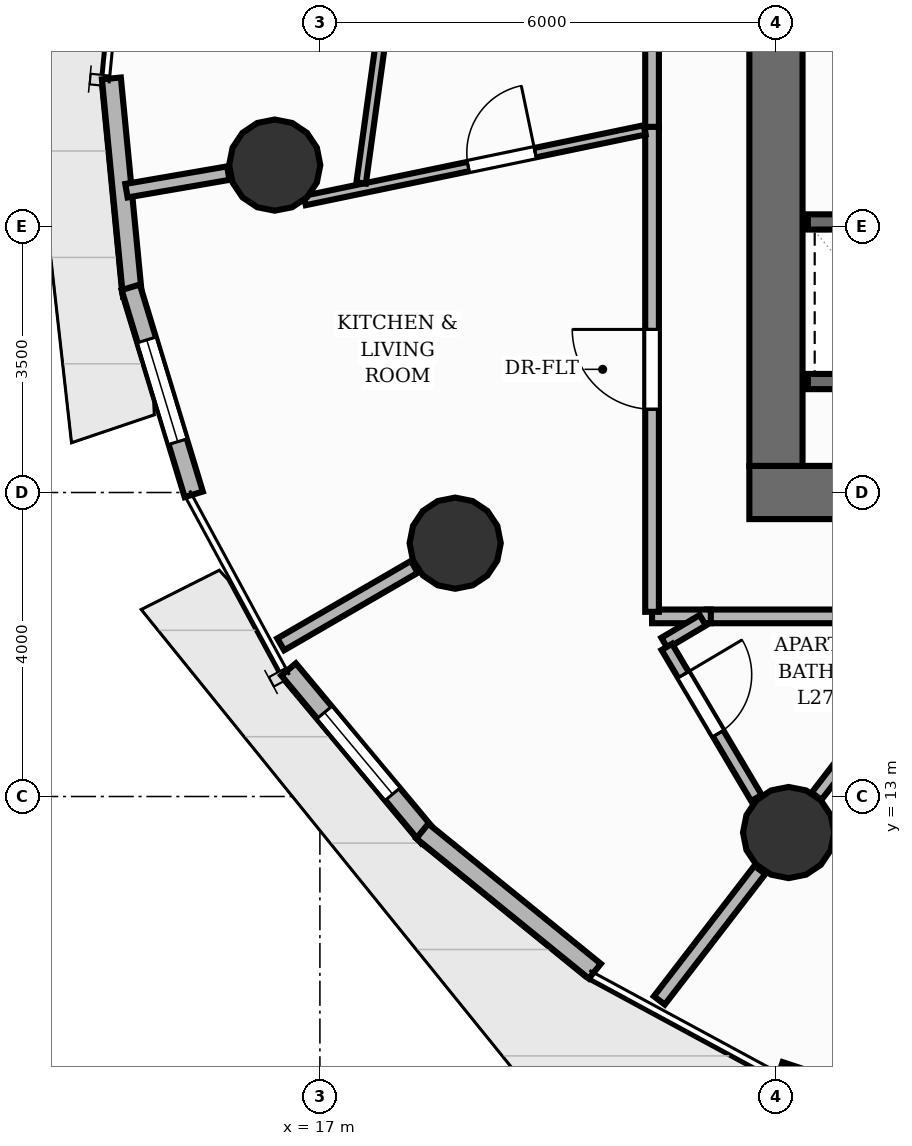
"""IFC4 building model, lengths in metres.
Left out: names, types, materials, properties, quantities, classifications, styles, units other than length and angle.
Written with IfcOpenShell. Run it as: python <this file> out.ifc"""

import sys

from ifc_helpers import new_model, si_unit, direction, frame, frame_2d, origin, origin_2d, place, context, subcontext, project, spatial, rectangle, circle, extrude, element, fill, save


model = new_model("IFC4")
c1 = context("Model", 3, precision=1e-05, world=origin(), true_north=direction((0.0, 1.0)))
c2 = subcontext(c1, "Body", "Model", "MODEL_VIEW")
j1 = project(units=[si_unit("LENGTHUNIT", "METRE"), si_unit("PLANEANGLEUNIT", "RADIAN")], contexts=[c1])
p1 = place(None, origin())
s1 = spatial("IfcSite", under=j1, at=p1, CompositionType="ELEMENT")
p2 = place(p1, origin())
s2 = spatial("IfcBuilding", under=s1, at=p2, CompositionType="ELEMENT")
p3 = place(p2, frame((0.0, 0.0, 93.28)))
s3 = spatial("IfcBuildingStorey", under=s2, at=p3, CompositionType="ELEMENT", Elevation=93.28)
p4 = place(p3, frame((22.65, 17.0, 0.0), z_axis=(0.0, 0.0, 1.0), x_axis=(1.0, 0.0, 0.0)))
e1 = element("IfcWall", 1, at=p4, inside=s3, PredefinedType="SHEAR", context=c2, shape_type="SweptSolid", body=[
    extrude(rectangle(XDim=18.7, YDim=0.7, at=frame_2d((9.35, 0.0))), origin(), (0.0, 0.0, 1.0), 3.2),
])
p5 = place(p4, frame((5.85, 0.0, 0.0)))
e2 = element("IfcOpeningElement", 2, at=p5, cuts=e1, PredefinedType="OPENING", context=c2, shape_type="SweptSolid", body=[
    extrude(rectangle(XDim=1.1, YDim=2.15, at=frame_2d((0.55, 1.075))), frame((0.0, 0.36, 0.0), z_axis=(0.0, -1.0, 0.0), x_axis=(1.0, 0.0, 0.0)), (0.0, 0.0, 1.0), 0.72),
])
p6 = place(p4, frame((9.4, 0.0, 0.0)))
e3 = element("IfcOpeningElement", 3, at=p6, cuts=e1, PredefinedType="OPENING", context=c2, shape_type="SweptSolid", body=[
    extrude(rectangle(XDim=0.9, YDim=2.1, at=frame_2d((0.45, 1.05))), frame((0.0, 0.36, 0.0), z_axis=(0.0, -1.0, 0.0), x_axis=(1.0, 0.0, 0.0)), (0.0, 0.0, 1.0), 0.72),
])
p7 = place(p3, frame((23.0, 17.35, 0.0), z_axis=(0.0, 0.0, 1.0), x_axis=(0.0, 1.0, 0.0)))
e4 = element("IfcWall", 4, at=p7, inside=s3, PredefinedType="SHEAR", context=c2, shape_type="SweptSolid", body=[
    extrude(rectangle(XDim=13.3, YDim=0.7, at=frame_2d((6.65, 0.0))), origin(), (0.0, 0.0, 1.0), 3.2),
])
for number, where, z_axis, x_axis in (
    (5, (16.406, 21.308, 0.0), (0.0, 0.0, 1.0), (1.0, 0.0, 0.0)),
    (6, (18.78, 16.333, 0.0), (0.0, 0.0, 1.0), (1.0, 0.0, 0.0)),
    (7, (23.167, 12.526, 0.0), (0.0, 0.0, 1.0), (1.0, 0.0, 0.0)),
):
    element("IfcColumn", number, at=place(p3, frame(where, z_axis=z_axis, x_axis=x_axis)), inside=s3, PredefinedType="COLUMN", context=c2, shape_type="SweptSolid", body=[
        extrude(circle(Radius=0.6, at=origin_2d()), origin(), (0.0, 0.0, 1.0), 3.2),
    ])
p8 = place(p3, frame((14.533, 19.588, 0.0), z_axis=(0.0, 0.0, 1.0), x_axis=(-0.096332339466, 0.995349225334, 0.0)))
e8 = element("IfcWall", 8, at=p8, inside=s3, PredefinedType="SOLIDWALL", context=c2, shape_type="SweptSolid", body=[
    extrude(rectangle(XDim=2.874, YDim=0.25, at=frame_2d((1.437, 0.0))), origin(), (0.0, 0.0, 1.0), 2.96),
])
p9 = place(p3, frame((15.34, 16.976, 0.0), z_axis=(0.0, 0.0, 1.0), x_axis=(-0.291144558409, 0.956679071637, 0.0)))
e9 = element("IfcWall", 9, at=p9, inside=s3, PredefinedType="SOLIDWALL", context=c2, shape_type="SweptSolid", body=[
    extrude(rectangle(XDim=2.848, YDim=0.25, at=frame_2d((1.424, 0.0))), origin(), (0.0, 0.0, 1.0), 2.96),
])
p10 = place(p9, frame((0.724, 0.0, 0.85)))
e10 = element("IfcOpeningElement", 10, at=p10, cuts=e9, PredefinedType="OPENING", context=c2, shape_type="SweptSolid", body=[
    extrude(rectangle(XDim=1.4, YDim=1.55, at=frame_2d((0.7, 0.775))), frame((0.0, 0.135, 0.0), z_axis=(0.0, -1.0, 0.0), x_axis=(1.0, 0.0, 0.0)), (0.0, 0.0, 1.0), 0.27),
])
p11 = place(p3, frame((18.428, 12.465, 0.0), z_axis=(0.0, 0.0, 1.0), x_axis=(-0.640518566271, 0.76794268423, 0.0)))
e11 = element("IfcWall", 11, at=p11, inside=s3, PredefinedType="SOLIDWALL", context=c2, shape_type="SweptSolid", body=[
    extrude(rectangle(XDim=2.874, YDim=0.25, at=frame_2d((1.437, 0.0))), origin(), (0.0, 0.0, 1.0), 2.96),
])
p12 = place(p11, frame((0.737, 0.0, 0.85)))
e12 = element("IfcOpeningElement", 12, at=p12, cuts=e11, PredefinedType="OPENING", context=c2, shape_type="SweptSolid", body=[
    extrude(rectangle(XDim=1.4, YDim=1.55, at=frame_2d((0.7, 0.775))), frame((0.0, 0.135, 0.0), z_axis=(0.0, -1.0, 0.0), x_axis=(1.0, 0.0, 0.0)), (0.0, 0.0, 1.0), 0.27),
])
p13 = place(p3, frame((20.617, 10.702, 0.0), z_axis=(0.0, 0.0, 1.0), x_axis=(-0.776285131062, 0.630381943976, 0.0)))
e13 = element("IfcWall", 13, at=p13, inside=s3, PredefinedType="SOLIDWALL", context=c2, shape_type="SweptSolid", body=[
    extrude(rectangle(XDim=2.923, YDim=0.25, at=frame_2d((1.462, 0.0))), origin(), (0.0, 0.0, 1.0), 2.96),
])
p14 = place(p3, frame((25.955, 8.426, 0.0), z_axis=(0.0, 0.0, 1.0), x_axis=(-0.949533409058, 0.313665913166, 0.0)))
e14 = element("IfcWall", 14, at=p14, inside=s3, PredefinedType="SOLIDWALL", context=c2, shape_type="SweptSolid", body=[
    extrude(rectangle(XDim=3.061, YDim=0.25, at=frame_2d((1.53, 0.0))), origin(), (0.0, 0.0, 1.0), 2.96),
])
for number, where, z_axis, x_axis in (
    (15, (23.42, 18.46, 0.0), (0.0, 0.0, 1.0), (1.0, 0.0, 0.0)),
    (16, (23.42, 20.56, 0.0), (0.0, 0.0, 1.0), (1.0, 0.0, 0.0)),
):
    element("IfcWall", number, at=place(p3, frame(where, z_axis=z_axis, x_axis=x_axis)), inside=s3, PredefinedType="SHEAR", context=c2, shape_type="SweptSolid", body=[
        extrude(rectangle(XDim=1.71, YDim=0.2, at=frame_2d((0.855, 0.0))), origin(), (0.0, 0.0, 1.0), 3.2),
    ])
p15 = place(p3, frame((15.794, 21.202, 0.0), z_axis=(0.0, 0.0, 1.0), x_axis=(-0.98540615772, -0.170219576807, 0.0)))
e17 = element("IfcWall", 17, at=p15, inside=s3, PredefinedType="PARTITIONING", context=c2, shape_type="SweptSolid", body=[
    extrude(rectangle(XDim=1.36, YDim=0.18, at=frame_2d((0.68, 0.0))), origin(), (0.0, 0.0, 1.0), 2.26),
])
p16 = place(p3, frame((18.243, 16.022, 0.0), z_axis=(0.0, 0.0, 1.0), x_axis=(-0.865025978628, -0.501727073516, 0.0)))
e18 = element("IfcWall", 18, at=p16, inside=s3, PredefinedType="PARTITIONING", context=c2, shape_type="SweptSolid", body=[
    extrude(rectangle(XDim=2.033, YDim=0.18, at=frame_2d((1.017, 0.0))), origin(), (0.0, 0.0, 1.0), 2.26),
])
p17 = place(p3, frame((22.788, 12.034, 0.0), z_axis=(0.0, 0.0, 1.0), x_axis=(-0.610026423006, -0.792381071981, 0.0)))
e19 = element("IfcWall", 19, at=p17, inside=s3, PredefinedType="PARTITIONING", context=c2, shape_type="SweptSolid", body=[
    extrude(rectangle(XDim=2.167, YDim=0.18, at=frame_2d((1.084, 0.0))), origin(), (0.0, 0.0, 1.0), 2.26),
])
p18 = place(p3, frame((38.645, 15.37, 0.0), z_axis=(0.0, 0.0, 1.0), x_axis=(-1.0, 0.0, 0.0)))
e20 = element("IfcWall", 20, at=p18, inside=s3, PredefinedType="PARTITIONING", context=c2, shape_type="SweptSolid", body=[
    extrude(rectangle(XDim=16.557, YDim=0.18, at=frame_2d((8.278, 0.0))), origin(), (0.0, 0.0, 1.0), 2.955),
])
p19 = place(p18, frame((6.513, 0.0, 0.0)))
e21 = element("IfcOpeningElement", 21, at=p19, cuts=e20, PredefinedType="OPENING", context=c2, shape_type="SweptSolid", body=[
    extrude(rectangle(XDim=1.05, YDim=2.15, at=frame_2d((0.525, 1.075))), frame((0.0, 0.1, 0.0), z_axis=(0.0, -1.0, 0.0), x_axis=(1.0, 0.0, 0.0)), (0.0, 0.0, 1.0), 0.2),
])
p20 = place(p3, frame((21.37, 21.771, 0.0), z_axis=(0.0, 0.0, 1.0), x_axis=(0.0, 1.0, 0.0)))
e22 = element("IfcWall", 22, at=p20, inside=s3, PredefinedType="PARTITIONING", context=c2, shape_type="SweptSolid", body=[
    extrude(rectangle(XDim=10.859, YDim=0.18, at=frame_2d((5.43, 0.0))), origin(), (0.0, 0.0, 1.0), 2.955),
])
p21 = place(p3, frame((22.144, 15.37, 0.0), z_axis=(0.0, 0.0, 1.0), x_axis=(-1.0, 0.0, 0.0)))
e23 = element("IfcWall", 23, at=p21, inside=s3, PredefinedType="PARTITIONING", context=c2, shape_type="SweptSolid", body=[
    extrude(rectangle(XDim=0.773, YDim=0.18, at=frame_2d((0.387, 0.0))), origin(), (0.0, 0.0, 1.0), 2.955),
])
p22 = place(p3, frame((21.37, 15.43, 0.0), z_axis=(0.0, 0.0, 1.0), x_axis=(0.0, 1.0, 0.0)))
e24 = element("IfcWall", 24, at=p22, inside=s3, PredefinedType="PARTITIONING", context=c2, shape_type="SweptSolid", body=[
    extrude(rectangle(XDim=6.381, YDim=0.18, at=frame_2d((3.19, 0.0))), origin(), (0.0, 0.0, 1.0), 2.955),
])
p23 = place(p22, frame((2.666, 0.0, 0.0)))
e25 = element("IfcOpeningElement", 25, at=p23, cuts=e24, PredefinedType="OPENING", context=c2, shape_type="SweptSolid", body=[
    extrude(rectangle(XDim=1.05, YDim=2.15, at=frame_2d((0.525, 1.075))), frame((0.0, 0.1, 0.0), z_axis=(0.0, -1.0, 0.0), x_axis=(1.0, 0.0, 0.0)), (0.0, 0.0, 1.0), 0.2),
])
p24 = place(p3, frame((23.534, 13.003, 0.0), z_axis=(0.0, 0.0, 1.0), x_axis=(0.610033601295, 0.792375545617, 0.0)))
e26 = element("IfcWall", 26, at=p24, inside=s3, PredefinedType="PLUMBINGWALL", context=c2, shape_type="SweptSolid", body=[
    extrude(rectangle(XDim=2.887, YDim=0.16, at=frame_2d((1.443, 0.0))), origin(), (0.0, 0.0, 1.0), 2.26),
])
p25 = place(p3, frame((22.038, 15.319, 0.0), z_axis=(0.0, 0.0, 1.0), x_axis=(-0.860054653874, -0.510201913315, 0.0)))
e27 = element("IfcWall", 27, at=p25, inside=s3, PredefinedType="PLUMBINGWALL", context=c2, shape_type="SweptSolid", body=[
    extrude(rectangle(XDim=0.586, YDim=0.16, at=frame_2d((0.293, 0.0))), origin(), (0.0, 0.0, 1.0), 2.955),
])
p26 = place(p3, frame((21.564, 14.969, 0.0), z_axis=(0.0, 0.0, 1.0), x_axis=(0.51007742589, -0.860128490168, 0.0)))
e28 = element("IfcWall", 28, at=p26, inside=s3, PredefinedType="PLUMBINGWALL", context=c2, shape_type="SweptSolid", body=[
    extrude(rectangle(XDim=2.311, YDim=0.16, at=frame_2d((1.156, 0.0))), origin(), (0.0, 0.0, 1.0), 2.403),
])
p27 = place(p26, frame((0.426, 0.0, 0.0)))
e29 = element("IfcOpeningElement", 29, at=p27, cuts=e28, PredefinedType="OPENING", context=c2, shape_type="SweptSolid", body=[
    extrude(rectangle(XDim=0.9, YDim=2.1, at=frame_2d((0.45, 1.05))), frame((0.0, 0.09, 0.0), z_axis=(0.0, -1.0, 0.0), x_axis=(1.0, 0.0, 0.0)), (0.0, 0.0, 1.0), 0.18),
])
p28 = place(p3, frame((16.801, 20.842, 0.0), z_axis=(0.0, 0.0, 1.0), x_axis=(0.979089254375, 0.203431147977, 0.0)))
e30 = element("IfcWall", 30, at=p28, inside=s3, PredefinedType="PARTITIONING", context=c2, shape_type="SweptSolid", body=[
    extrude(rectangle(XDim=4.566, YDim=0.125, at=frame_2d((2.283, 0.0))), origin(), (0.0, 0.0, 1.0), 2.955),
])
p29 = place(p28, frame((2.196, 0.0, 0.0)))
e31 = element("IfcOpeningElement", 31, at=p29, cuts=e30, PredefinedType="OPENING", context=c2, shape_type="SweptSolid", body=[
    extrude(rectangle(XDim=0.9, YDim=2.1, at=frame_2d((0.45, 1.05))), frame((0.0, 0.073, 0.0), z_axis=(0.0, -1.0, 0.0), x_axis=(1.0, 0.0, 0.0)), (0.0, 0.0, 1.0), 0.145),
])
p30 = place(p3, frame((17.542, 21.073, 0.0), z_axis=(0.0, 0.0, 1.0), x_axis=(0.136714950607, 0.99061042912, 0.0)))
e32 = element("IfcWall", 32, at=p30, inside=s3, PredefinedType="PARTITIONING", context=c2, shape_type="SweptSolid", body=[
    extrude(rectangle(XDim=10.12, YDim=0.125, at=frame_2d((5.06, 0.0))), origin(), (0.0, 0.0, 1.0), 2.955),
])
p31 = place(p30, frame((4.47, 0.0, 0.0)))
e33 = element("IfcOpeningElement", 33, at=p31, cuts=e32, PredefinedType="OPENING", context=c2, shape_type="SweptSolid", body=[
    extrude(rectangle(XDim=0.9, YDim=2.1, at=frame_2d((0.45, 1.05))), frame((0.0, 0.073, 0.0), z_axis=(0.0, -1.0, 0.0), x_axis=(1.0, 0.0, 0.0)), (0.0, 0.0, 1.0), 0.145),
])
p32 = place(p10, origin())
e34 = element("IfcWindow", 34, at=p32, inside=s3, PartitioningType="SINGLE_PANEL", PredefinedType="WINDOW", context=c2, shape_type="SweptSolid", body=[
    extrude(rectangle(XDim=1.4, YDim=1.55, at=frame_2d((0.7, 0.775))), frame((0.0, 0.03, 0.0), z_axis=(0.0, -1.0, 0.0), x_axis=(1.0, 0.0, 0.0)), (0.0, 0.0, 1.0), 0.06),
])
fill(e10, e34)
p33 = place(p12, origin())
e35 = element("IfcWindow", 35, at=p33, inside=s3, PartitioningType="SINGLE_PANEL", PredefinedType="WINDOW", context=c2, shape_type="SweptSolid", body=[
    extrude(rectangle(XDim=1.4, YDim=1.55, at=frame_2d((0.7, 0.775))), frame((0.0, 0.03, 0.0), z_axis=(0.0, -1.0, 0.0), x_axis=(1.0, 0.0, 0.0)), (0.0, 0.0, 1.0), 0.06),
])
fill(e12, e35)
p34 = place(p23, origin())
e36 = element("IfcDoor", 36, at=p34, inside=s3, OperationType="SINGLE_SWING_RIGHT", PredefinedType="DOOR", context=c2, shape_type="SweptSolid", body=[
    extrude(rectangle(XDim=1.05, YDim=2.15, at=frame_2d((0.525, 1.075))), frame((0.0, 0.025, 0.0), z_axis=(0.0, -1.0, 0.0), x_axis=(1.0, 0.0, 0.0)), (0.0, 0.0, 1.0), 0.05),
])
fill(e25, e36)
p35 = place(p27, origin())
e37 = element("IfcDoor", 37, at=p35, inside=s3, OperationType="SINGLE_SWING_LEFT", PredefinedType="DOOR", context=c2, shape_type="SweptSolid", body=[
    extrude(rectangle(XDim=0.9, YDim=2.1, at=frame_2d((0.45, 1.05))), frame((0.0, 0.025, 0.0), z_axis=(0.0, -1.0, 0.0), x_axis=(1.0, 0.0, 0.0)), (0.0, 0.0, 1.0), 0.05),
])
fill(e29, e37)
p36 = place(p29, origin())
e38 = element("IfcDoor", 38, at=p36, inside=s3, OperationType="SINGLE_SWING_RIGHT", PredefinedType="DOOR", context=c2, shape_type="SweptSolid", body=[
    extrude(rectangle(XDim=0.9, YDim=2.1, at=frame_2d((0.45, 1.05))), frame((0.0, 0.025, 0.0), z_axis=(0.0, -1.0, 0.0), x_axis=(1.0, 0.0, 0.0)), (0.0, 0.0, 1.0), 0.05),
])
fill(e31, e38)
save(model, sys.argv[1])
